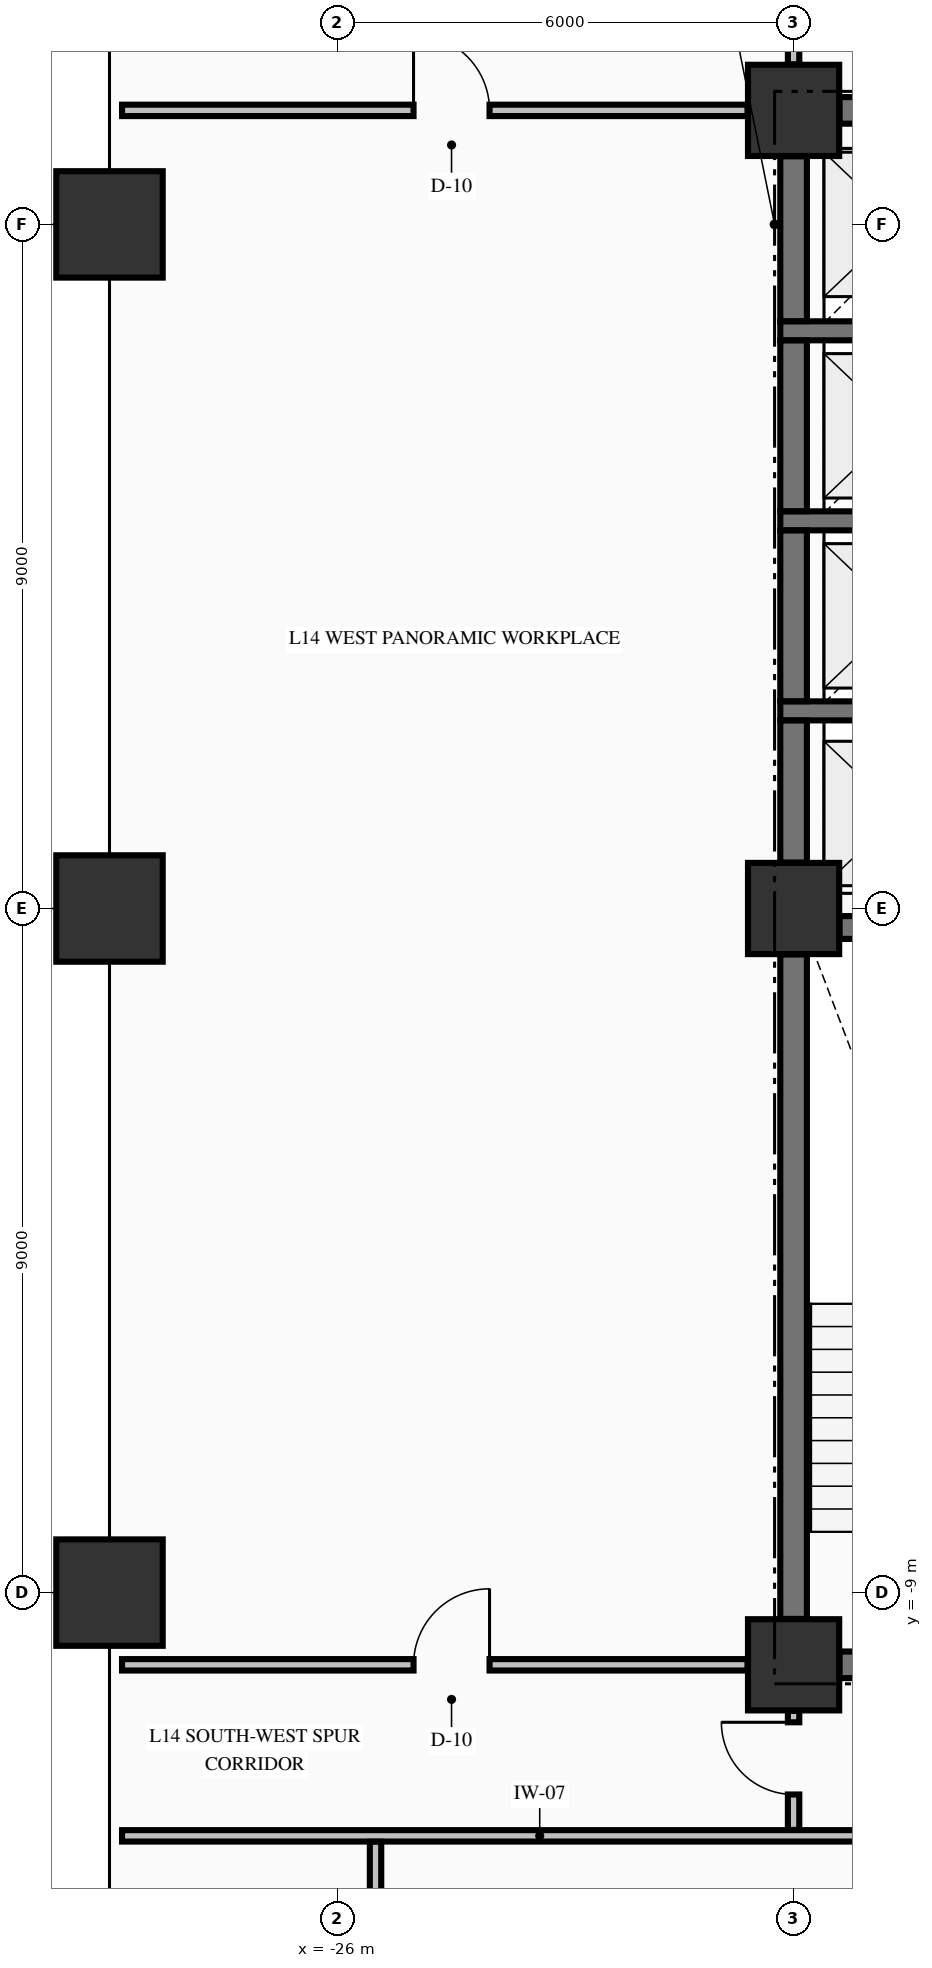
"""IFC4 building model, lengths in metres.
Left out: names, types, materials, properties, quantities, classifications, styles, units other than length and angle.
Written with IfcOpenShell. Run it as: python <this file> out.ifc"""

import sys

from ifc_helpers import new_model, si_unit, direction, frame, frame_2d, origin, origin_2d, place, context, subcontext, project, spatial, rectangle, extrude, element, fill, save


model = new_model("IFC4")
c1 = context("Model", 3, precision=1e-05, world=origin(), true_north=direction((0.0, 1.0)))
c2 = subcontext(c1, "Body", "Model", "MODEL_VIEW")
j1 = project(units=[si_unit("LENGTHUNIT", "METRE"), si_unit("PLANEANGLEUNIT", "RADIAN")], contexts=[c1])
p1 = place(None, origin())
s1 = spatial("IfcSite", under=j1, at=p1, CompositionType="ELEMENT")
p2 = place(p1, origin())
s2 = spatial("IfcBuilding", under=s1, at=p2, CompositionType="ELEMENT")
p3 = place(p2, frame((0.0, 0.0, 60.76)))
s3 = spatial("IfcBuildingStorey", under=s2, at=p3, CompositionType="ELEMENT", Elevation=60.76)
for number, where, z_axis, x_axis in (
    (1, (-29.0, -9.0, -0.3), (0.0, 0.0, 1.0), (1.0, 0.0, 0.0)),
    (2, (-29.0, 0.0, -0.3), (0.0, 0.0, 1.0), (1.0, 0.0, 0.0)),
    (3, (-29.0, 9.0, -0.3), (0.0, 0.0, 1.0), (1.0, 0.0, 0.0)),
):
    element("IfcColumn", number, at=place(p3, frame(where, z_axis=z_axis, x_axis=x_axis)), inside=s3, PredefinedType="COLUMN", context=c2, shape_type="SweptSolid", body=[
        extrude(rectangle(XDim=1.4, YDim=1.4, at=origin_2d()), origin(), (0.0, 0.0, 1.0), 3.62),
    ])
for number, where, z_axis, x_axis in (
    (4, (-20.0, -9.95, -0.3), (0.0, 0.0, 1.0), (1.0, 0.0, 0.0)),
    (5, (-20.0, 10.5, -0.3), (0.0, 0.0, 1.0), (1.0, 0.0, 0.0)),
    (6, (-20.0, 0.0, -0.3), (0.0, 0.0, 1.0), (1.0, 0.0, 0.0)),
):
    element("IfcColumn", number, at=place(p3, frame(where, z_axis=z_axis, x_axis=x_axis)), inside=s3, PredefinedType="COLUMN", context=c2, shape_type="SweptSolid", body=[
        extrude(rectangle(XDim=1.2, YDim=1.2, at=origin_2d()), origin(), (0.0, 0.0, 1.0), 3.62),
    ])
p4 = place(p3, frame((-19.396, -9.95, 0.0), z_axis=(0.0, 0.0, 1.0), x_axis=(1.0, 0.0, 0.0)))
e7 = element("IfcWall", 7, at=p4, inside=s3, PredefinedType="SHEAR", context=c2, shape_type="SweptSolid", body=[
    extrude(rectangle(XDim=4.696, YDim=0.35, at=frame_2d((2.348, 0.0))), origin(), (0.0, 0.0, 1.0), 3.32),
])
p5 = place(p4, frame((0.571, 0.0, 0.0)))
e8 = element("IfcOpeningElement", 8, at=p5, cuts=e7, PredefinedType="OPENING", context=c2, shape_type="SweptSolid", body=[
    extrude(rectangle(XDim=1.05, YDim=2.15, at=frame_2d((0.525, 1.075))), frame((0.0, 0.185, 0.0), z_axis=(0.0, -1.0, 0.0), x_axis=(1.0, 0.0, 0.0)), (0.0, 0.0, 1.0), 0.37),
])
p6 = place(p3, frame((-19.396, -0.25, 0.0), z_axis=(0.0, 0.0, 1.0), x_axis=(1.0, 0.0, 0.0)))
e9 = element("IfcWall", 9, at=p6, inside=s3, PredefinedType="SHEAR", context=c2, shape_type="SweptSolid", body=[
    extrude(rectangle(XDim=7.792, YDim=0.3, at=frame_2d((3.896, 0.0))), origin(), (0.0, 0.0, 1.0), 3.32),
])
p7 = place(p6, frame((5.696, 0.0, 0.0)))
e10 = element("IfcOpeningElement", 10, at=p7, cuts=e9, PredefinedType="OPENING", context=c2, shape_type="SweptSolid", body=[
    extrude(rectangle(XDim=1.1, YDim=2.15, at=frame_2d((0.55, 1.075))), frame((0.0, 0.16, 0.0), z_axis=(0.0, -1.0, 0.0), x_axis=(1.0, 0.0, 0.0)), (0.0, 0.0, 1.0), 0.32),
])
for number, where, z_axis, x_axis in (
    (11, (-20.175, 2.6, 0.0), (0.0, 0.0, 1.0), (1.0, 0.0, 0.0)),
    (12, (-20.175, 5.1, 0.0), (0.0, 0.0, 1.0), (1.0, 0.0, 0.0)),
    (13, (-20.175, 7.6, 0.0), (0.0, 0.0, 1.0), (1.0, 0.0, 0.0)),
):
    element("IfcWall", number, at=place(p3, frame(where, z_axis=z_axis, x_axis=x_axis)), inside=s3, PredefinedType="SOLIDWALL", context=c2, shape_type="SweptSolid", body=[
        extrude(rectangle(XDim=3.1, YDim=0.25, at=frame_2d((1.55, 0.0))), origin(), (0.0, 0.0, 1.0), 3.32),
    ])
p8 = place(p3, frame((-19.396, 10.5, 0.0), z_axis=(0.0, 0.0, 1.0), x_axis=(1.0, 0.0, 0.0)))
e14 = element("IfcWall", 14, at=p8, inside=s3, PredefinedType="SHEAR", context=c2, shape_type="SweptSolid", body=[
    extrude(rectangle(XDim=4.696, YDim=0.35, at=frame_2d((2.348, 0.0))), origin(), (0.0, 0.0, 1.0), 3.32),
])
p9 = place(p8, frame((2.796, 0.0, 0.0)))
e15 = element("IfcOpeningElement", 15, at=p9, cuts=e14, PredefinedType="OPENING", context=c2, shape_type="SweptSolid", body=[
    extrude(rectangle(XDim=1.2, YDim=2.15, at=frame_2d((0.6, 1.075))), frame((0.0, 0.185, 0.0), z_axis=(0.0, -1.0, 0.0), x_axis=(1.0, 0.0, 0.0)), (0.0, 0.0, 1.0), 0.37),
])
p10 = place(p3, frame((-28.835, -12.2, 0.0), z_axis=(0.0, 0.0, 1.0), x_axis=(1.0, 0.0, 0.0)))
e16 = element("IfcWall", 16, at=p10, inside=s3, PredefinedType="PARTITIONING", context=c2, shape_type="SweptSolid", body=[
    extrude(rectangle(XDim=52.67, YDim=0.15, at=frame_2d((26.335, 0.0))), origin(), (0.0, 0.0, 1.0), 3.32),
])
p11 = place(p10, frame((10.99, 0.0, 0.0)))
e17 = element("IfcOpeningElement", 17, at=p11, cuts=e16, PredefinedType="OPENING", context=c2, shape_type="SweptSolid", body=[
    extrude(rectangle(XDim=1.05, YDim=2.15, at=frame_2d((0.525, 1.075))), frame((0.0, 0.085, 0.0), z_axis=(0.0, -1.0, 0.0), x_axis=(1.0, 0.0, 0.0)), (0.0, 0.0, 1.0), 0.17),
])
p12 = place(p10, frame((18.86, 0.0, 0.0)))
e18 = element("IfcOpeningElement", 18, at=p12, cuts=e16, PredefinedType="OPENING", context=c2, shape_type="SweptSolid", body=[
    extrude(rectangle(XDim=0.95, YDim=2.15, at=frame_2d((0.475, 1.075))), frame((0.0, 0.085, 0.0), z_axis=(0.0, -1.0, 0.0), x_axis=(1.0, 0.0, 0.0)), (0.0, 0.0, 1.0), 0.17),
])
p13 = place(p10, frame((23.21, 0.0, 0.0)))
e19 = element("IfcOpeningElement", 19, at=p13, cuts=e16, PredefinedType="OPENING", context=c2, shape_type="SweptSolid", body=[
    extrude(rectangle(XDim=0.95, YDim=2.15, at=frame_2d((0.475, 1.075))), frame((0.0, 0.085, 0.0), z_axis=(0.0, -1.0, 0.0), x_axis=(1.0, 0.0, 0.0)), (0.0, 0.0, 1.0), 0.17),
])
p14 = place(p10, frame((27.56, 0.0, 0.0)))
e20 = element("IfcOpeningElement", 20, at=p14, cuts=e16, PredefinedType="OPENING", context=c2, shape_type="SweptSolid", body=[
    extrude(rectangle(XDim=0.95, YDim=2.15, at=frame_2d((0.475, 1.075))), frame((0.0, 0.085, 0.0), z_axis=(0.0, -1.0, 0.0), x_axis=(1.0, 0.0, 0.0)), (0.0, 0.0, 1.0), 0.17),
])
p15 = place(p10, frame((36.86, 0.0, 0.0)))
e21 = element("IfcOpeningElement", 21, at=p15, cuts=e16, PredefinedType="OPENING", context=c2, shape_type="SweptSolid", body=[
    extrude(rectangle(XDim=1.05, YDim=2.15, at=frame_2d((0.525, 1.075))), frame((0.0, 0.085, 0.0), z_axis=(0.0, -1.0, 0.0), x_axis=(1.0, 0.0, 0.0)), (0.0, 0.0, 1.0), 0.17),
])
p16 = place(p10, frame((44.84, 0.0, 0.0)))
e22 = element("IfcOpeningElement", 22, at=p16, cuts=e16, PredefinedType="OPENING", context=c2, shape_type="SweptSolid", body=[
    extrude(rectangle(XDim=0.95, YDim=2.15, at=frame_2d((0.475, 1.075))), frame((0.0, 0.085, 0.0), z_axis=(0.0, -1.0, 0.0), x_axis=(1.0, 0.0, 0.0)), (0.0, 0.0, 1.0), 0.17),
])
p17 = place(p3, frame((-28.835, -9.95, 0.0), z_axis=(0.0, 0.0, 1.0), x_axis=(1.0, 0.0, 0.0)))
e23 = element("IfcWall", 23, at=p17, inside=s3, PredefinedType="PARTITIONING", context=c2, shape_type="SweptSolid", body=[
    extrude(rectangle(XDim=8.229, YDim=0.15, at=frame_2d((4.115, 0.0))), origin(), (0.0, 0.0, 1.0), 3.32),
])
p18 = place(p17, frame((3.835, 0.0, 0.0)))
e24 = element("IfcOpeningElement", 24, at=p18, cuts=e23, PredefinedType="OPENING", context=c2, shape_type="SweptSolid", body=[
    extrude(rectangle(XDim=1.0, YDim=2.15, at=frame_2d((0.5, 1.075))), frame((0.0, 0.085, 0.0), z_axis=(0.0, -1.0, 0.0), x_axis=(1.0, 0.0, 0.0)), (0.0, 0.0, 1.0), 0.17),
])
p19 = place(p3, frame((-28.835, 10.5, 0.0), z_axis=(0.0, 0.0, 1.0), x_axis=(1.0, 0.0, 0.0)))
e25 = element("IfcWall", 25, at=p19, inside=s3, PredefinedType="PARTITIONING", context=c2, shape_type="SweptSolid", body=[
    extrude(rectangle(XDim=8.229, YDim=0.15, at=frame_2d((4.115, 0.0))), origin(), (0.0, 0.0, 1.0), 3.32),
])
p20 = place(p19, frame((3.835, 0.0, 0.0)))
e26 = element("IfcOpeningElement", 26, at=p20, cuts=e25, PredefinedType="OPENING", context=c2, shape_type="SweptSolid", body=[
    extrude(rectangle(XDim=1.0, YDim=2.15, at=frame_2d((0.5, 1.075))), frame((0.0, 0.085, 0.0), z_axis=(0.0, -1.0, 0.0), x_axis=(1.0, 0.0, 0.0)), (0.0, 0.0, 1.0), 0.17),
])
p21 = place(p3, frame((-20.0, -9.346, 0.0), z_axis=(0.0, 0.0, 1.0), x_axis=(0.0, 1.0, 0.0)))
e27 = element("IfcWall", 27, at=p21, inside=s3, PredefinedType="SHEAR", context=c2, shape_type="SweptSolid", body=[
    extrude(rectangle(XDim=8.742, YDim=0.35, at=frame_2d((4.371, 0.0))), origin(), (0.0, 0.0, 1.0), 3.32),
])
p22 = place(p3, frame((-20.0, 0.604, 0.0), z_axis=(0.0, 0.0, 1.0), x_axis=(0.0, 1.0, 0.0)))
e28 = element("IfcWall", 28, at=p22, inside=s3, PredefinedType="SHEAR", context=c2, shape_type="SweptSolid", body=[
    extrude(rectangle(XDim=1.869, YDim=0.35, at=frame_2d((0.935, 0.0))), origin(), (0.0, 0.0, 1.0), 3.32),
])
for number, where, z_axis, x_axis in (
    (29, (-20.0, 2.727, 0.0), (0.0, 0.0, 1.0), (0.0, 1.0, 0.0)),
    (30, (-20.0, 5.227, 0.0), (0.0, 0.0, 1.0), (0.0, 1.0, 0.0)),
):
    element("IfcWall", number, at=place(p3, frame(where, z_axis=z_axis, x_axis=x_axis)), inside=s3, PredefinedType="SHEAR", context=c2, shape_type="SweptSolid", body=[
        extrude(rectangle(XDim=2.246, YDim=0.35, at=frame_2d((1.123, 0.0))), origin(), (0.0, 0.0, 1.0), 3.32),
    ])
p23 = place(p3, frame((-20.0, 7.727, 0.0), z_axis=(0.0, 0.0, 1.0), x_axis=(0.0, 1.0, 0.0)))
e31 = element("IfcWall", 31, at=p23, inside=s3, PredefinedType="SHEAR", context=c2, shape_type="SweptSolid", body=[
    extrude(rectangle(XDim=2.169, YDim=0.35, at=frame_2d((1.084, 0.0))), origin(), (0.0, 0.0, 1.0), 3.32),
])
p24 = place(p3, frame((-25.5, -22.294, 0.0), z_axis=(0.0, 0.0, 1.0), x_axis=(0.0, 1.0, 0.0)))
e32 = element("IfcWall", 32, at=p24, inside=s3, PredefinedType="PARTITIONING", context=c2, shape_type="SweptSolid", body=[
    extrude(rectangle(XDim=10.016, YDim=0.15, at=frame_2d((5.008, 0.0))), origin(), (0.0, 0.0, 1.0), 3.32),
])
p25 = place(p3, frame((-20.0, -12.122, 0.0), z_axis=(0.0, 0.0, 1.0), x_axis=(0.0, 1.0, 0.0)))
e33 = element("IfcWall", 33, at=p25, inside=s3, PredefinedType="PARTITIONING", context=c2, shape_type="SweptSolid", body=[
    extrude(rectangle(XDim=1.566, YDim=0.15, at=frame_2d((0.783, 0.0))), origin(), (0.0, 0.0, 1.0), 2.66),
])
p26 = place(p25, frame((0.466, 0.0, 0.0)))
e34 = element("IfcOpeningElement", 34, at=p26, cuts=e33, PredefinedType="OPENING", context=c2, shape_type="SweptSolid", body=[
    extrude(rectangle(XDim=0.95, YDim=2.15, at=frame_2d((0.475, 1.075))), frame((0.0, 0.085, 0.0), z_axis=(0.0, -1.0, 0.0), x_axis=(1.0, 0.0, 0.0)), (0.0, 0.0, 1.0), 0.17),
])
p27 = place(p3, frame((-20.0, 11.106, 0.0), z_axis=(0.0, 0.0, 1.0), x_axis=(0.0, 1.0, 0.0)))
e35 = element("IfcWall", 35, at=p27, inside=s3, PredefinedType="PARTITIONING", context=c2, shape_type="SweptSolid", body=[
    extrude(rectangle(XDim=2.366, YDim=0.15, at=frame_2d((1.183, 0.0))), origin(), (0.0, 0.0, 1.0), 2.66),
])
p28 = place(p27, frame((0.449, 0.0, 0.0)))
e36 = element("IfcOpeningElement", 36, at=p28, cuts=e35, PredefinedType="OPENING", context=c2, shape_type="SweptSolid", body=[
    extrude(rectangle(XDim=0.95, YDim=2.15, at=frame_2d((0.475, 1.075))), frame((0.0, 0.085, 0.0), z_axis=(0.0, -1.0, 0.0), x_axis=(1.0, 0.0, 0.0)), (0.0, 0.0, 1.0), 0.17),
])
p29 = place(p26, origin())
e37 = element("IfcDoor", 37, at=p29, inside=s3, OperationType="SINGLE_SWING_RIGHT", PredefinedType="DOOR", context=c2, shape_type="SweptSolid", body=[
    extrude(rectangle(XDim=0.95, YDim=2.15, at=frame_2d((0.475, 1.075))), frame((0.0, 0.025, 0.0), z_axis=(0.0, -1.0, 0.0), x_axis=(1.0, 0.0, 0.0)), (0.0, 0.0, 1.0), 0.05),
])
fill(e34, e37)
p30 = place(p20, origin())
e38 = element("IfcDoor", 38, at=p30, inside=s3, OperationType="SINGLE_SWING_LEFT", PredefinedType="DOOR", context=c2, shape_type="SweptSolid", body=[
    extrude(rectangle(XDim=1.0, YDim=2.15, at=frame_2d((0.5, 1.075))), frame((0.0, 0.025, 0.0), z_axis=(0.0, -1.0, 0.0), x_axis=(1.0, 0.0, 0.0)), (0.0, 0.0, 1.0), 0.05),
])
fill(e26, e38)
p31 = place(p18, origin())
e39 = element("IfcDoor", 39, at=p31, inside=s3, OperationType="SINGLE_SWING_RIGHT", PredefinedType="DOOR", context=c2, shape_type="SweptSolid", body=[
    extrude(rectangle(XDim=1.0, YDim=2.15, at=frame_2d((0.5, 1.075))), frame((0.0, 0.025, 0.0), z_axis=(0.0, -1.0, 0.0), x_axis=(1.0, 0.0, 0.0)), (0.0, 0.0, 1.0), 0.05),
])
fill(e24, e39)
save(model, sys.argv[1])
